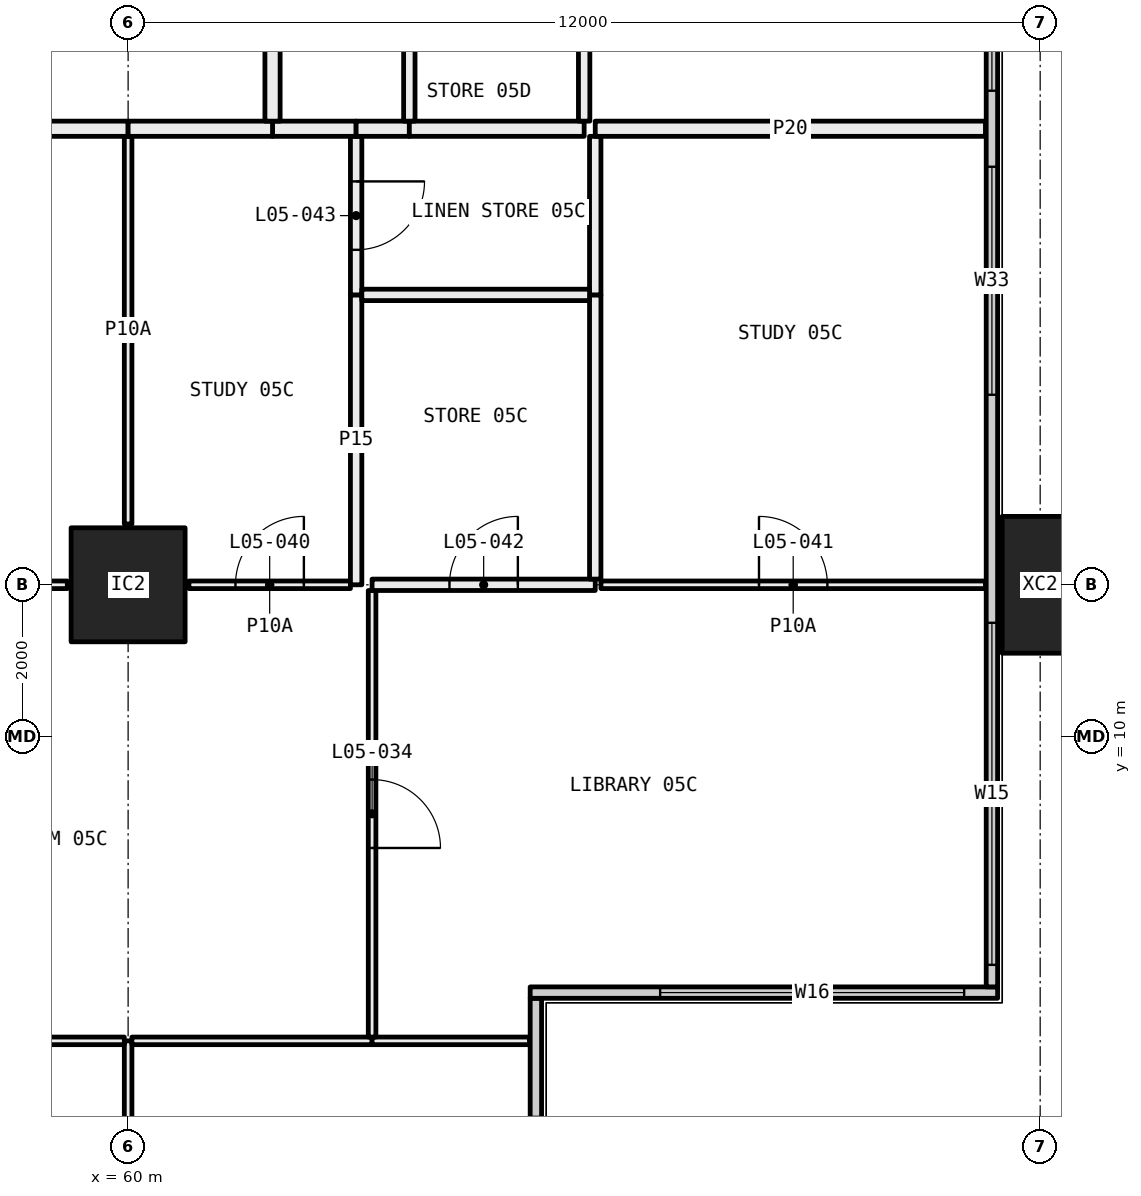
"""IFC4 building model, lengths in metres.
Left out: names, types, materials, properties, quantities, classifications, styles, units other than length and angle.
Written with IfcOpenShell. Run it as: python <this file> out.ifc"""

import sys

from ifc_helpers import new_model, si_unit, direction, frame, frame_2d, origin, origin_2d, place, context, subcontext, project, spatial, rectangle, hollow_rectangle, extrude, element, fill, save


model = new_model("IFC4")
c1 = context("Model", 3, precision=1e-05, world=origin(), true_north=direction((0.0, 1.0)))
c2 = subcontext(c1, "Body", "Model", "MODEL_VIEW")
j1 = project(units=[si_unit("LENGTHUNIT", "METRE"), si_unit("PLANEANGLEUNIT", "RADIAN")], contexts=[c1])
p1 = place(None, origin())
s1 = spatial("IfcSite", under=j1, at=p1, CompositionType="ELEMENT")
p2 = place(p1, origin())
s2 = spatial("IfcBuilding", under=s1, at=p2, CompositionType="ELEMENT")
p3 = place(p2, frame((0.0, 0.0, 30.0)))
s3 = spatial("IfcBuildingStorey", under=s2, at=p3, CompositionType="ELEMENT", Elevation=30.0)
p4 = place(p3, frame((60.0, 12.0, 0.0), z_axis=(0.0, 0.0, 1.0), x_axis=(1.0, 0.0, 0.0)))
e1 = element("IfcColumn", 1, at=p4, inside=s3, PredefinedType="COLUMN", context=c2, shape_type="SweptSolid", body=[
    extrude(hollow_rectangle(XDim=1.5, YDim=1.5, WallThickness=0.065, at=origin_2d()), origin(), (0.0, 0.0, 1.0), 3.05),
])
p5 = place(p3, frame((72.0, 12.0, -0.4), z_axis=(0.0, 0.0, 1.0), x_axis=(0.0, 1.0, 0.0)))
e2 = element("IfcColumn", 2, at=p5, inside=s3, PredefinedType="COLUMN", context=c2, shape_type="SweptSolid", body=[
    extrude(hollow_rectangle(XDim=1.8, YDim=1.0, WallThickness=0.07, at=origin_2d()), origin(), (0.0, 0.0, 1.0), 3.45),
])
p6 = place(p3, frame((65.365, 0.71, 0.0), z_axis=(0.0, 0.0, 1.0), x_axis=(0.0, 1.0, 0.0)))
e3 = element("IfcWall", 3, at=p6, inside=s3, PredefinedType="ELEMENTEDWALL", context=c2, shape_type="SweptSolid", body=[
    extrude(rectangle(XDim=5.85, YDim=0.15, at=frame_2d((2.925, 0.0))), origin(), (0.0, 0.0, 1.0), 3.05),
])
p7 = place(p6, frame((0.29, 0.0, 0.45)))
e4 = element("IfcOpeningElement", 4, at=p7, cuts=e3, PredefinedType="OPENING", context=c2, shape_type="SweptSolid", body=[
    extrude(rectangle(XDim=4.0, YDim=2.55, at=frame_2d((2.0, 1.275))), frame((0.0, 0.085, 0.0), z_axis=(0.0, -1.0, 0.0), x_axis=(1.0, 0.0, 0.0)), (0.0, 0.0, 1.0), 0.17),
])
p8 = place(p3, frame((65.29, 6.635, 0.0), z_axis=(0.0, 0.0, 1.0), x_axis=(1.0, 0.0, 0.0)))
e5 = element("IfcWall", 5, at=p8, inside=s3, PredefinedType="ELEMENTEDWALL", context=c2, shape_type="SweptSolid", body=[
    extrude(rectangle(XDim=6.15, YDim=0.15, at=frame_2d((3.075, 0.0))), origin(), (0.0, 0.0, 1.0), 3.05),
])
p9 = place(p8, frame((1.71, 0.0, 0.45)))
e6 = element("IfcOpeningElement", 6, at=p9, cuts=e5, PredefinedType="OPENING", context=c2, shape_type="SweptSolid", body=[
    extrude(rectangle(XDim=4.0, YDim=2.55, at=frame_2d((2.0, 1.275))), frame((0.0, 0.085, 0.0), z_axis=(0.0, -1.0, 0.0), x_axis=(1.0, 0.0, 0.0)), (0.0, 0.0, 1.0), 0.17),
])
p10 = place(p3, frame((71.365, 6.71, 0.0), z_axis=(0.0, 0.0, 1.0), x_axis=(0.0, 1.0, 0.0)))
e7 = element("IfcWall", 7, at=p10, inside=s3, PredefinedType="ELEMENTEDWALL", context=c2, shape_type="SweptSolid", body=[
    extrude(rectangle(XDim=34.58, YDim=0.15, at=frame_2d((17.29, 0.0))), origin(), (0.0, 0.0, 1.0), 3.05),
])
p11 = place(p10, frame((0.29, 0.0, 0.45)))
e8 = element("IfcOpeningElement", 8, at=p11, cuts=e7, PredefinedType="OPENING", context=c2, shape_type="SweptSolid", body=[
    extrude(rectangle(XDim=4.5, YDim=2.55, at=frame_2d((2.25, 1.275))), frame((0.0, 0.085, 0.0), z_axis=(0.0, -1.0, 0.0), x_axis=(1.0, 0.0, 0.0)), (0.0, 0.0, 1.0), 0.17),
])
p12 = place(p10, frame((7.79, 0.0, 0.45)))
e9 = element("IfcOpeningElement", 9, at=p12, cuts=e7, PredefinedType="OPENING", context=c2, shape_type="SweptSolid", body=[
    extrude(rectangle(XDim=3.0, YDim=2.55, at=frame_2d((1.5, 1.275))), frame((0.0, 0.085, 0.0), z_axis=(0.0, -1.0, 0.0), x_axis=(1.0, 0.0, 0.0)), (0.0, 0.0, 1.0), 0.17),
])
p13 = place(p10, frame((11.79, 0.0, 0.45)))
e10 = element("IfcOpeningElement", 10, at=p13, cuts=e7, PredefinedType="OPENING", context=c2, shape_type="SweptSolid", body=[
    extrude(rectangle(XDim=3.0, YDim=2.55, at=frame_2d((1.5, 1.275))), frame((0.0, 0.085, 0.0), z_axis=(0.0, -1.0, 0.0), x_axis=(1.0, 0.0, 0.0)), (0.0, 0.0, 1.0), 0.17),
])
p14 = place(p10, frame((19.79, 0.0, 0.45)))
e11 = element("IfcOpeningElement", 11, at=p14, cuts=e7, PredefinedType="OPENING", context=c2, shape_type="SweptSolid", body=[
    extrude(rectangle(XDim=3.0, YDim=2.55, at=frame_2d((1.5, 1.275))), frame((0.0, 0.085, 0.0), z_axis=(0.0, -1.0, 0.0), x_axis=(1.0, 0.0, 0.0)), (0.0, 0.0, 1.0), 0.17),
])
p15 = place(p10, frame((23.79, 0.0, 0.45)))
e12 = element("IfcOpeningElement", 12, at=p15, cuts=e7, PredefinedType="OPENING", context=c2, shape_type="SweptSolid", body=[
    extrude(rectangle(XDim=2.0, YDim=2.55, at=frame_2d((1.0, 1.275))), frame((0.0, 0.085, 0.0), z_axis=(0.0, -1.0, 0.0), x_axis=(1.0, 0.0, 0.0)), (0.0, 0.0, 1.0), 0.17),
])
p16 = place(p10, frame((29.79, 0.0, 0.45)))
e13 = element("IfcOpeningElement", 13, at=p16, cuts=e7, PredefinedType="OPENING", context=c2, shape_type="SweptSolid", body=[
    extrude(rectangle(XDim=4.5, YDim=2.55, at=frame_2d((2.25, 1.275))), frame((0.0, 0.085, 0.0), z_axis=(0.0, -1.0, 0.0), x_axis=(1.0, 0.0, 0.0)), (0.0, 0.0, 1.0), 0.17),
])
p17 = place(p3, frame((60.0, 0.72, 0.0), z_axis=(0.0, 0.0, 1.0), x_axis=(0.0, 1.0, 0.0)))
e14 = element("IfcWall", 14, at=p17, inside=s3, PredefinedType="PARTITIONING", context=c2, shape_type="SweptSolid", body=[
    extrude(rectangle(XDim=5.28, YDim=0.1, at=frame_2d((2.64, 0.0))), origin(), (0.0, 0.0, 1.0), 2.45),
])
p18 = place(p17, frame((2.19, 0.0, 0.0)))
e15 = element("IfcOpeningElement", 15, at=p18, cuts=e14, PredefinedType="OPENING", context=c2, shape_type="SweptSolid", body=[
    extrude(rectangle(XDim=0.9, YDim=2.1, at=frame_2d((0.45, 1.05))), frame((0.0, 0.06, 0.0), z_axis=(0.0, -1.0, 0.0), x_axis=(1.0, 0.0, 0.0)), (0.0, 0.0, 1.0), 0.12),
])
p19 = place(p3, frame((59.95, 6.0, 0.0), z_axis=(0.0, 0.0, 1.0), x_axis=(-1.0, 0.0, 0.0)))
e16 = element("IfcWall", 16, at=p19, inside=s3, PredefinedType="PARTITIONING", context=c2, shape_type="SweptSolid", body=[
    extrude(rectangle(XDim=4.81, YDim=0.1, at=frame_2d((2.405, 0.0))), origin(), (0.0, 0.0, 1.0), 2.45),
])
p20 = place(p3, frame((63.21, 6.0, 0.0), z_axis=(0.0, 0.0, 1.0), x_axis=(-1.0, 0.0, 0.0)))
e17 = element("IfcWall", 17, at=p20, inside=s3, PredefinedType="PARTITIONING", context=c2, shape_type="SweptSolid", body=[
    extrude(rectangle(XDim=3.16, YDim=0.1, at=frame_2d((1.58, 0.0))), origin(), (0.0, 0.0, 1.0), 2.45),
])
p21 = place(p3, frame((65.28, 6.0, 0.0), z_axis=(0.0, 0.0, 1.0), x_axis=(-1.0, 0.0, 0.0)))
e18 = element("IfcWall", 18, at=p21, inside=s3, PredefinedType="PARTITIONING", context=c2, shape_type="SweptSolid", body=[
    extrude(rectangle(XDim=2.07, YDim=0.1, at=frame_2d((1.035, 0.0))), origin(), (0.0, 0.0, 1.0), 3.05),
])
p22 = place(p3, frame((63.21, 6.05, 0.0), z_axis=(0.0, 0.0, 1.0), x_axis=(0.0, 1.0, 0.0)))
e19 = element("IfcWall", 19, at=p22, inside=s3, PredefinedType="PARTITIONING", context=c2, shape_type="SweptSolid", body=[
    extrude(rectangle(XDim=5.875, YDim=0.1, at=frame_2d((2.938, 0.0))), origin(), (0.0, 0.0, 1.0), 2.45),
])
p23 = place(p22, frame((2.488, 0.0, 0.0)))
e20 = element("IfcOpeningElement", 20, at=p23, cuts=e19, PredefinedType="OPENING", context=c2, shape_type="SweptSolid", body=[
    extrude(rectangle(XDim=0.9, YDim=2.1, at=frame_2d((0.45, 1.05))), frame((0.0, 0.06, 0.0), z_axis=(0.0, -1.0, 0.0), x_axis=(1.0, 0.0, 0.0)), (0.0, 0.0, 1.0), 0.12),
])
p24 = place(p3, frame((59.2, 12.0, 0.0), z_axis=(0.0, 0.0, 1.0), x_axis=(-1.0, 0.0, 0.0)))
e21 = element("IfcWall", 21, at=p24, inside=s3, PredefinedType="PARTITIONING", context=c2, shape_type="SweptSolid", body=[
    extrude(rectangle(XDim=3.7, YDim=0.1, at=frame_2d((1.85, 0.0))), origin(), (0.0, 0.0, 1.0), 2.45),
])
p25 = place(p3, frame((62.925, 12.0, 0.0), z_axis=(0.0, 0.0, 1.0), x_axis=(-1.0, 0.0, 0.0)))
e22 = element("IfcWall", 22, at=p25, inside=s3, PredefinedType="PARTITIONING", context=c2, shape_type="SweptSolid", body=[
    extrude(rectangle(XDim=2.125, YDim=0.1, at=frame_2d((1.062, 0.0))), origin(), (0.0, 0.0, 1.0), 2.45),
])
p26 = place(p25, frame((0.613, 0.0, 0.0)))
e23 = element("IfcOpeningElement", 23, at=p26, cuts=e22, PredefinedType="OPENING", context=c2, shape_type="SweptSolid", body=[
    extrude(rectangle(XDim=0.9, YDim=2.1, at=frame_2d((0.45, 1.05))), frame((0.0, 0.06, 0.0), z_axis=(0.0, -1.0, 0.0), x_axis=(1.0, 0.0, 0.0)), (0.0, 0.0, 1.0), 0.12),
])
p27 = place(p3, frame((71.28, 12.0, 0.0), z_axis=(0.0, 0.0, 1.0), x_axis=(-1.0, 0.0, 0.0)))
e24 = element("IfcWall", 24, at=p27, inside=s3, PredefinedType="PARTITIONING", context=c2, shape_type="SweptSolid", body=[
    extrude(rectangle(XDim=5.059, YDim=0.1, at=frame_2d((2.53, 0.0))), origin(), (0.0, 0.0, 1.0), 2.45),
])
p28 = place(p27, frame((2.08, 0.0, 0.0)))
e25 = element("IfcOpeningElement", 25, at=p28, cuts=e24, PredefinedType="OPENING", context=c2, shape_type="SweptSolid", body=[
    extrude(rectangle(XDim=0.9, YDim=2.1, at=frame_2d((0.45, 1.05))), frame((0.0, 0.06, 0.0), z_axis=(0.0, -1.0, 0.0), x_axis=(1.0, 0.0, 0.0)), (0.0, 0.0, 1.0), 0.12),
])
p29 = place(p3, frame((66.146, 12.0, 0.0), z_axis=(0.0, 0.0, 1.0), x_axis=(-1.0, 0.0, 0.0)))
e26 = element("IfcWall", 26, at=p29, inside=s3, PredefinedType="PARTITIONING", context=c2, shape_type="SweptSolid", body=[
    extrude(rectangle(XDim=2.936, YDim=0.15, at=frame_2d((1.468, 0.0))), origin(), (0.0, 0.0, 1.0), 2.45),
])
p30 = place(p29, frame((1.018, 0.0, 0.0)))
e27 = element("IfcOpeningElement", 27, at=p30, cuts=e26, PredefinedType="OPENING", context=c2, shape_type="SweptSolid", body=[
    extrude(rectangle(XDim=0.9, YDim=2.1, at=frame_2d((0.45, 1.05))), frame((0.0, 0.085, 0.0), z_axis=(0.0, -1.0, 0.0), x_axis=(1.0, 0.0, 0.0)), (0.0, 0.0, 1.0), 0.17),
])
p31 = place(p3, frame((60.0, 12.8, 0.0), z_axis=(0.0, 0.0, 1.0), x_axis=(0.0, 1.0, 0.0)))
e28 = element("IfcWall", 28, at=p31, inside=s3, PredefinedType="PARTITIONING", context=c2, shape_type="SweptSolid", body=[
    extrude(rectangle(XDim=5.1, YDim=0.1, at=frame_2d((2.55, 0.0))), origin(), (0.0, 0.0, 1.0), 3.05),
])
p32 = place(p3, frame((60.0, 18.0, 0.0), z_axis=(0.0, 0.0, 1.0), x_axis=(-1.0, 0.0, 0.0)))
e29 = element("IfcWall", 29, at=p32, inside=s3, PredefinedType="PARTITIONING", context=c2, shape_type="SweptSolid", body=[
    extrude(rectangle(XDim=4.5, YDim=0.2, at=frame_2d((2.25, 0.0))), origin(), (0.0, 0.0, 1.0), 3.05),
])
p33 = place(p3, frame((63.0, 12.0, 0.0), z_axis=(0.0, 0.0, 1.0), x_axis=(0.0, 1.0, 0.0)))
e30 = element("IfcWall", 30, at=p33, inside=s3, PredefinedType="PARTITIONING", context=c2, shape_type="SweptSolid", body=[
    extrude(rectangle(XDim=3.814, YDim=0.15, at=frame_2d((1.907, 0.0))), origin(), (0.0, 0.0, 1.0), 2.45),
])
p34 = place(p3, frame((63.0, 15.814, 0.0), z_axis=(0.0, 0.0, 1.0), x_axis=(0.0, 1.0, 0.0)))
e31 = element("IfcWall", 31, at=p34, inside=s3, PredefinedType="PARTITIONING", context=c2, shape_type="SweptSolid", body=[
    extrude(rectangle(XDim=2.086, YDim=0.15, at=frame_2d((1.043, 0.0))), origin(), (0.0, 0.0, 1.0), 3.05),
])
p35 = place(p34, frame((0.593, 0.0, 0.0)))
e32 = element("IfcOpeningElement", 32, at=p35, cuts=e31, PredefinedType="OPENING", context=c2, shape_type="SweptSolid", body=[
    extrude(rectangle(XDim=0.9, YDim=2.1, at=frame_2d((0.45, 1.05))), frame((0.0, 0.085, 0.0), z_axis=(0.0, -1.0, 0.0), x_axis=(1.0, 0.0, 0.0)), (0.0, 0.0, 1.0), 0.17),
])
p36 = place(p3, frame((63.0, 18.0, 0.0), z_axis=(0.0, 0.0, 1.0), x_axis=(-1.0, 0.0, 0.0)))
e33 = element("IfcWall", 33, at=p36, inside=s3, PredefinedType="PARTITIONING", context=c2, shape_type="SweptSolid", body=[
    extrude(rectangle(XDim=1.1, YDim=0.2, at=frame_2d((0.55, 0.0))), origin(), (0.0, 0.0, 1.0), 3.05),
])
p37 = place(p3, frame((61.9, 18.0, 0.0), z_axis=(0.0, 0.0, 1.0), x_axis=(-1.0, 0.0, 0.0)))
e34 = element("IfcWall", 34, at=p37, inside=s3, PredefinedType="PARTITIONING", context=c2, shape_type="SweptSolid", body=[
    extrude(rectangle(XDim=1.9, YDim=0.2, at=frame_2d((0.95, 0.0))), origin(), (0.0, 0.0, 1.0), 3.05),
])
p38 = place(p3, frame((66.146, 15.814, 0.0), z_axis=(0.0, 0.0, 1.0), x_axis=(0.0, -1.0, 0.0)))
e35 = element("IfcWall", 35, at=p38, inside=s3, PredefinedType="PARTITIONING", context=c2, shape_type="SweptSolid", body=[
    extrude(rectangle(XDim=3.739, YDim=0.15, at=frame_2d((1.87, 0.0))), origin(), (0.0, 0.0, 1.0), 2.45),
])
p39 = place(p3, frame((66.146, 17.9, 0.0), z_axis=(0.0, 0.0, 1.0), x_axis=(0.0, -1.0, 0.0)))
e36 = element("IfcWall", 36, at=p39, inside=s3, PredefinedType="PARTITIONING", context=c2, shape_type="SweptSolid", body=[
    extrude(rectangle(XDim=2.086, YDim=0.15, at=frame_2d((1.043, 0.0))), origin(), (0.0, 0.0, 1.0), 2.55),
])
p40 = place(p3, frame((71.28, 18.0, 0.0), z_axis=(0.0, 0.0, 1.0), x_axis=(-1.0, 0.0, 0.0)))
e37 = element("IfcWall", 37, at=p40, inside=s3, PredefinedType="PARTITIONING", context=c2, shape_type="SweptSolid", body=[
    extrude(rectangle(XDim=5.134, YDim=0.2, at=frame_2d((2.567, 0.0))), origin(), (0.0, 0.0, 1.0), 3.05),
])
p41 = place(p3, frame((66.071, 15.814, 0.0), z_axis=(0.0, 0.0, 1.0), x_axis=(-1.0, 0.0, 0.0)))
e38 = element("IfcWall", 38, at=p41, inside=s3, PredefinedType="PARTITIONING", context=c2, shape_type="SweptSolid", body=[
    extrude(rectangle(XDim=2.996, YDim=0.15, at=frame_2d((1.498, 0.0))), origin(), (0.0, 0.0, 1.0), 3.05),
])
p42 = place(p3, frame((63.7, 18.0, 0.0), z_axis=(0.0, 0.0, 1.0), x_axis=(-1.0, 0.0, 0.0)))
e39 = element("IfcWall", 39, at=p42, inside=s3, PredefinedType="PARTITIONING", context=c2, shape_type="SweptSolid", body=[
    extrude(rectangle(XDim=0.7, YDim=0.2, at=frame_2d((0.35, 0.0))), origin(), (0.0, 0.0, 1.0), 3.05),
])
p43 = place(p3, frame((66.0, 18.0, 0.0), z_axis=(0.0, 0.0, 1.0), x_axis=(-1.0, 0.0, 0.0)))
e40 = element("IfcWall", 40, at=p43, inside=s3, PredefinedType="PARTITIONING", context=c2, shape_type="SweptSolid", body=[
    extrude(rectangle(XDim=2.3, YDim=0.2, at=frame_2d((1.15, 0.0))), origin(), (0.0, 0.0, 1.0), 3.05),
])
p44 = place(p3, frame((66.0, 21.0, 0.0), z_axis=(0.0, 0.0, 1.0), x_axis=(0.0, -1.0, 0.0)))
e41 = element("IfcWall", 41, at=p44, inside=s3, PredefinedType="PARTITIONING", context=c2, shape_type="SweptSolid", body=[
    extrude(rectangle(XDim=2.9, YDim=0.15, at=frame_2d((1.45, 0.0))), origin(), (0.0, 0.0, 1.0), 3.05),
])
p45 = place(p44, frame((1.0, 0.0, 0.0)))
e42 = element("IfcOpeningElement", 42, at=p45, cuts=e41, PredefinedType="OPENING", context=c2, shape_type="SweptSolid", body=[
    extrude(rectangle(XDim=0.9, YDim=2.1, at=frame_2d((0.45, 1.05))), frame((0.0, 0.085, 0.0), z_axis=(0.0, -1.0, 0.0), x_axis=(1.0, 0.0, 0.0)), (0.0, 0.0, 1.0), 0.17),
])
p46 = place(p3, frame((63.7, 18.1, 0.0), z_axis=(0.0, 0.0, 1.0), x_axis=(0.0, 1.0, 0.0)))
e43 = element("IfcWall", 43, at=p46, inside=s3, PredefinedType="PARTITIONING", context=c2, shape_type="SweptSolid", body=[
    extrude(rectangle(XDim=2.9, YDim=0.15, at=frame_2d((1.45, 0.0))), origin(), (0.0, 0.0, 1.0), 3.05),
])
p47 = place(p3, frame((61.9, 21.0, 0.0), z_axis=(0.0, 0.0, 1.0), x_axis=(0.0, -1.0, 0.0)))
e44 = element("IfcWall", 44, at=p47, inside=s3, PredefinedType="PARTITIONING", context=c2, shape_type="SweptSolid", body=[
    extrude(rectangle(XDim=2.9, YDim=0.2, at=frame_2d((1.45, 0.0))), origin(), (0.0, 0.0, 1.0), 3.05),
])
p48 = place(p9, origin())
e45 = element("IfcWindow", 45, at=p48, inside=s3, PartitioningType="SINGLE_PANEL", PredefinedType="WINDOW", context=c2, shape_type="SweptSolid", body=[
    extrude(rectangle(XDim=4.0, YDim=2.55, at=frame_2d((2.0, 1.275))), frame((0.0, 0.03, 0.0), z_axis=(0.0, -1.0, 0.0), x_axis=(1.0, 0.0, 0.0)), (0.0, 0.0, 1.0), 0.06),
])
fill(e6, e45)
p49 = place(p11, origin())
e46 = element("IfcWindow", 46, at=p49, inside=s3, PartitioningType="SINGLE_PANEL", PredefinedType="WINDOW", context=c2, shape_type="SweptSolid", body=[
    extrude(rectangle(XDim=4.5, YDim=2.55, at=frame_2d((2.25, 1.275))), frame((0.0, 0.03, 0.0), z_axis=(0.0, -1.0, 0.0), x_axis=(1.0, 0.0, 0.0)), (0.0, 0.0, 1.0), 0.06),
])
fill(e8, e46)
p50 = place(p12, origin())
e47 = element("IfcWindow", 47, at=p50, inside=s3, PartitioningType="SINGLE_PANEL", PredefinedType="WINDOW", context=c2, shape_type="SweptSolid", body=[
    extrude(rectangle(XDim=3.0, YDim=2.55, at=frame_2d((1.5, 1.275))), frame((0.0, 0.03, 0.0), z_axis=(0.0, -1.0, 0.0), x_axis=(1.0, 0.0, 0.0)), (0.0, 0.0, 1.0), 0.06),
])
fill(e9, e47)
p51 = place(p13, origin())
e48 = element("IfcWindow", 48, at=p51, inside=s3, PartitioningType="SINGLE_PANEL", PredefinedType="WINDOW", context=c2, shape_type="SweptSolid", body=[
    extrude(rectangle(XDim=3.0, YDim=2.55, at=frame_2d((1.5, 1.275))), frame((0.0, 0.03, 0.0), z_axis=(0.0, -1.0, 0.0), x_axis=(1.0, 0.0, 0.0)), (0.0, 0.0, 1.0), 0.06),
])
fill(e10, e48)
p52 = place(p23, frame((0.9, 0.0, 0.0), x_axis=(-1.0, 0.0, 0.0)))
e49 = element("IfcDoor", 49, at=p52, inside=s3, OperationType="SINGLE_SWING_LEFT", PredefinedType="DOOR", context=c2, shape_type="SweptSolid", body=[
    extrude(rectangle(XDim=0.9, YDim=2.1, at=frame_2d((0.45, 1.05))), frame((0.0, 0.025, 0.0), z_axis=(0.0, -1.0, 0.0), x_axis=(1.0, 0.0, 0.0)), (0.0, 0.0, 1.0), 0.05),
])
fill(e20, e49)
p53 = place(p26, frame((0.9, 0.0, 0.0), x_axis=(-1.0, 0.0, 0.0)))
e50 = element("IfcDoor", 50, at=p53, inside=s3, OperationType="SINGLE_SWING_LEFT", PredefinedType="DOOR", context=c2, shape_type="SweptSolid", body=[
    extrude(rectangle(XDim=0.9, YDim=2.1, at=frame_2d((0.45, 1.05))), frame((0.0, 0.025, 0.0), z_axis=(0.0, -1.0, 0.0), x_axis=(1.0, 0.0, 0.0)), (0.0, 0.0, 1.0), 0.05),
])
fill(e23, e50)
p54 = place(p28, frame((0.9, 0.0, 0.0), x_axis=(-1.0, 0.0, 0.0)))
e51 = element("IfcDoor", 51, at=p54, inside=s3, OperationType="SINGLE_SWING_RIGHT", PredefinedType="DOOR", context=c2, shape_type="SweptSolid", body=[
    extrude(rectangle(XDim=0.9, YDim=2.1, at=frame_2d((0.45, 1.05))), frame((0.0, 0.025, 0.0), z_axis=(0.0, -1.0, 0.0), x_axis=(1.0, 0.0, 0.0)), (0.0, 0.0, 1.0), 0.05),
])
fill(e25, e51)
p55 = place(p30, frame((0.9, 0.0, 0.0), x_axis=(-1.0, 0.0, 0.0)))
e52 = element("IfcDoor", 52, at=p55, inside=s3, OperationType="SINGLE_SWING_LEFT", PredefinedType="DOOR", context=c2, shape_type="SweptSolid", body=[
    extrude(rectangle(XDim=0.9, YDim=2.1, at=frame_2d((0.45, 1.05))), frame((0.0, 0.025, 0.0), z_axis=(0.0, -1.0, 0.0), x_axis=(1.0, 0.0, 0.0)), (0.0, 0.0, 1.0), 0.05),
])
fill(e27, e52)
p56 = place(p35, frame((0.9, 0.0, 0.0), x_axis=(-1.0, 0.0, 0.0)))
e53 = element("IfcDoor", 53, at=p56, inside=s3, OperationType="SINGLE_SWING_RIGHT", PredefinedType="DOOR", context=c2, shape_type="SweptSolid", body=[
    extrude(rectangle(XDim=0.9, YDim=2.1, at=frame_2d((0.45, 1.05))), frame((0.0, 0.025, 0.0), z_axis=(0.0, -1.0, 0.0), x_axis=(1.0, 0.0, 0.0)), (0.0, 0.0, 1.0), 0.05),
])
fill(e32, e53)
save(model, sys.argv[1])
